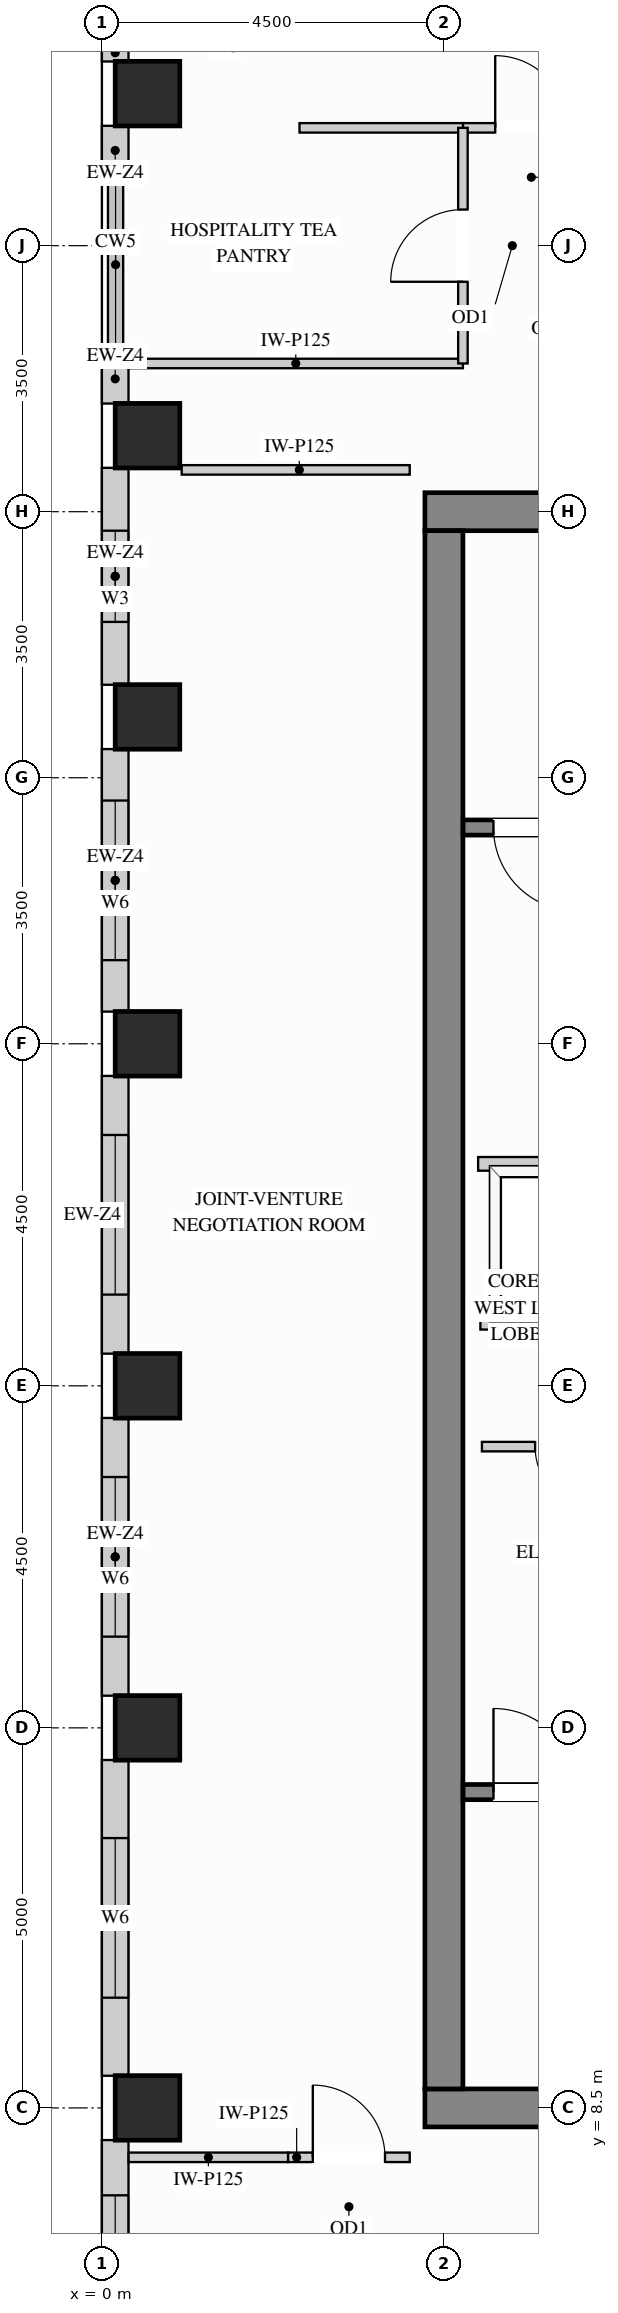
"""IFC4 building model, lengths in metres.
Left out: names, types, materials, properties, quantities, classifications, styles, units other than length and angle.
Written with IfcOpenShell. Run it as: python <this file> out.ifc"""

import sys

from ifc_helpers import new_model, si_unit, direction, frame, frame_2d, origin, origin_2d, place, context, subcontext, project, spatial, rectangle, extrude, source, transform, mapped, element, fill, save


model = new_model("IFC4")
c1 = context("Model", 3, precision=1e-05, world=origin(), true_north=direction((0.0, 1.0)))
c2 = subcontext(c1, "Body", "Model", "MODEL_VIEW")
j1 = project(units=[si_unit("LENGTHUNIT", "METRE"), si_unit("PLANEANGLEUNIT", "RADIAN")], contexts=[c1])
p1 = place(None, origin())
s1 = spatial("IfcSite", under=j1, at=p1, CompositionType="ELEMENT")
p2 = place(p1, origin())
s2 = spatial("IfcBuilding", under=s1, at=p2, CompositionType="ELEMENT")
p3 = place(p2, frame((0.0, 0.0, 262.8)))
s3 = spatial("IfcBuildingStorey", under=s2, at=p3, CompositionType="ELEMENT", Elevation=262.8)
m1 = source(origin(), c2, "Body", "SweptSolid", [
    extrude(rectangle(XDim=0.85, YDim=0.85, at=origin_2d()), origin(), (0.0, 0.0, 1.0), 3.4),
])
for number, where, z_axis, x_axis in (
    (1, (0.6, 13.5, 0.0), (0.0, 0.0, 1.0), (1.0, 0.0, 0.0)),
    (2, (0.6, 18.0, 0.0), (0.0, 0.0, 1.0), (1.0, 0.0, 0.0)),
    (3, (0.6, 22.5, 0.0), (0.0, 0.0, 1.0), (1.0, 0.0, 0.0)),
    (4, (0.6, 26.8, 0.0), (0.0, 0.0, 1.0), (1.0, 0.0, 0.0)),
    (5, (0.6, 30.5, 0.0), (0.0, 0.0, 1.0), (1.0, 0.0, 0.0)),
    (6, (0.6, 35.0, 0.0), (0.0, 0.0, 1.0), (1.0, 0.0, 0.0)),
    (7, (0.6, 8.5, 0.0), (0.0, 0.0, 1.0), (1.0, 0.0, 0.0)),
):
    element("IfcColumn", number, at=place(p3, frame(where, z_axis=z_axis, x_axis=x_axis)), inside=s3, PredefinedType="COLUMN", context=c2, shape_type="MappedRepresentation", body=[
        mapped(m1, transform((0.0, 0.0, 0.0), x_axis=(1.0, 0.0, 0.0), y_axis=(0.0, 1.0, 0.0), z_axis=(0.0, 0.0, 1.0))),
    ])
m2 = source(origin(), c2, "Body", "SweptSolid", [
    extrude(rectangle(XDim=10.5, YDim=0.5, at=frame_2d((5.25, 0.0))), origin(), (0.0, 0.0, 1.0), 3.4),
])
for number, where, z_axis, x_axis in (
    (8, (4.25, 29.5, 0.0), (0.0, 0.0, 1.0), (1.0, 0.0, 0.0)),
    (9, (4.25, 8.5, 0.0), (0.0, 0.0, 1.0), (1.0, 0.0, 0.0)),
):
    element("IfcWall", number, at=place(p3, frame(where, z_axis=z_axis, x_axis=x_axis)), inside=s3, PredefinedType="SHEAR", context=c2, shape_type="MappedRepresentation", body=[
        mapped(m2, transform((0.0, 0.0, 0.0), x_axis=(1.0, 0.0, 0.0), y_axis=(0.0, 1.0, 0.0), z_axis=(0.0, 0.0, 1.0))),
    ])
m3 = source(origin(), c2, "Body", "SweptSolid", [
    extrude(rectangle(XDim=20.5, YDim=0.5, at=frame_2d((10.25, 0.0))), origin(), (0.0, 0.0, 1.0), 3.4),
])
p4 = place(p3, frame((4.5, 8.75, 0.0), z_axis=(0.0, 0.0, 1.0), x_axis=(0.0, 1.0, 0.0)))
e10 = element("IfcWall", 10, at=p4, inside=s3, PredefinedType="SHEAR", context=c2, shape_type="MappedRepresentation", body=[
    mapped(m3, transform((0.0, 0.0, 0.0), x_axis=(1.0, 0.0, 0.0), y_axis=(0.0, 1.0, 0.0), z_axis=(0.0, 0.0, 1.0))),
])
m4 = source(origin(), c2, "Body", "SweptSolid", [
    extrude(rectangle(XDim=0.229, YDim=0.35, at=frame_2d((0.115, 0.0))), origin(), (0.0, 0.0, 1.0), 3.385),
])
p5 = place(p3, frame((0.175, 35.652, 0.0), z_axis=(0.0, 0.0, 1.0), x_axis=(0.0, -1.0, 0.0)))
e11 = element("IfcWall", 11, at=p5, inside=s3, PredefinedType="SOLIDWALL", context=c2, shape_type="MappedRepresentation", body=[
    mapped(m4, transform((0.0, 0.0, 0.0), x_axis=(1.0, 0.0, 0.0), y_axis=(0.0, 1.0, 0.0), z_axis=(0.0, 0.0, 1.0))),
])
m5 = source(origin(), c2, "Body", "SweptSolid", [
    extrude(rectangle(XDim=0.527, YDim=0.35, at=frame_2d((0.263, 0.0))), origin(), (0.0, 0.0, 1.0), 3.385),
])
for number, where, z_axis, x_axis in (
    (12, (0.175, 34.577, 0.0), (0.0, 0.0, 1.0), (0.0, -1.0, 0.0)),
    (13, (0.175, 31.45, 0.0), (0.0, 0.0, 1.0), (0.0, -1.0, 0.0)),
):
    element("IfcWall", number, at=place(p3, frame(where, z_axis=z_axis, x_axis=x_axis)), inside=s3, PredefinedType="SOLIDWALL", context=c2, shape_type="MappedRepresentation", body=[
        mapped(m5, transform((0.0, 0.0, 0.0), x_axis=(1.0, 0.0, 0.0), y_axis=(0.0, 1.0, 0.0), z_axis=(0.0, 0.0, 1.0))),
    ])
p6 = place(p3, frame((0.175, 30.077, 0.0), z_axis=(0.0, 0.0, 1.0), x_axis=(0.0, -1.0, 0.0)))
e14 = element("IfcWall", 14, at=p6, inside=s3, PredefinedType="SOLIDWALL", context=c2, shape_type="SweptSolid", body=[
    extrude(rectangle(XDim=2.854, YDim=0.35, at=frame_2d((1.427, 0.0))), origin(), (0.0, 0.0, 1.0), 3.385),
])
p7 = place(p6, frame((0.827, 0.0, 0.78)))
e15 = element("IfcOpeningElement", 15, at=p7, cuts=e14, PredefinedType="OPENING", context=c2, shape_type="SweptSolid", body=[
    extrude(rectangle(XDim=1.2, YDim=2.25, at=frame_2d((0.6, 1.125))), frame((0.0, 0.185, 0.0), z_axis=(0.0, -1.0, 0.0), x_axis=(1.0, 0.0, 0.0)), (0.0, 0.0, 1.0), 0.37),
])
p8 = place(p3, frame((0.175, 26.377, 0.0), z_axis=(0.0, 0.0, 1.0), x_axis=(0.0, -1.0, 0.0)))
e16 = element("IfcWall", 16, at=p8, inside=s3, PredefinedType="SOLIDWALL", context=c2, shape_type="SweptSolid", body=[
    extrude(rectangle(XDim=3.454, YDim=0.35, at=frame_2d((1.727, 0.0))), origin(), (0.0, 0.0, 1.0), 3.385),
])
p9 = place(p8, frame((0.677, 0.0, 0.78)))
e17 = element("IfcOpeningElement", 17, at=p9, cuts=e16, PredefinedType="OPENING", context=c2, shape_type="SweptSolid", body=[
    extrude(rectangle(XDim=2.1, YDim=2.25, at=frame_2d((1.05, 1.125))), frame((0.0, 0.185, 0.0), z_axis=(0.0, -1.0, 0.0), x_axis=(1.0, 0.0, 0.0)), (0.0, 0.0, 1.0), 0.37),
])
p10 = place(p3, frame((0.175, 22.077, 0.0), z_axis=(0.0, 0.0, 1.0), x_axis=(0.0, -1.0, 0.0)))
e18 = element("IfcWall", 18, at=p10, inside=s3, PredefinedType="SOLIDWALL", context=c2, shape_type="SweptSolid", body=[
    extrude(rectangle(XDim=3.654, YDim=0.35, at=frame_2d((1.827, 0.0))), origin(), (0.0, 0.0, 1.0), 3.385),
])
p11 = place(p10, frame((0.777, 0.0, 0.78)))
e19 = element("IfcOpeningElement", 19, at=p11, cuts=e18, PredefinedType="OPENING", context=c2, shape_type="SweptSolid", body=[
    extrude(rectangle(XDim=2.1, YDim=2.25, at=frame_2d((1.05, 1.125))), frame((0.0, 0.185, 0.0), z_axis=(0.0, -1.0, 0.0), x_axis=(1.0, 0.0, 0.0)), (0.0, 0.0, 1.0), 0.37),
])
p12 = place(p3, frame((0.175, 17.577, 0.0), z_axis=(0.0, 0.0, 1.0), x_axis=(0.0, -1.0, 0.0)))
e20 = element("IfcWall", 20, at=p12, inside=s3, PredefinedType="SOLIDWALL", context=c2, shape_type="SweptSolid", body=[
    extrude(rectangle(XDim=3.654, YDim=0.35, at=frame_2d((1.827, 0.0))), origin(), (0.0, 0.0, 1.0), 3.385),
])
p13 = place(p12, frame((0.777, 0.0, 0.78)))
e21 = element("IfcOpeningElement", 21, at=p13, cuts=e20, PredefinedType="OPENING", context=c2, shape_type="SweptSolid", body=[
    extrude(rectangle(XDim=2.1, YDim=2.25, at=frame_2d((1.05, 1.125))), frame((0.0, 0.185, 0.0), z_axis=(0.0, -1.0, 0.0), x_axis=(1.0, 0.0, 0.0)), (0.0, 0.0, 1.0), 0.37),
])
p14 = place(p3, frame((0.175, 13.077, 0.0), z_axis=(0.0, 0.0, 1.0), x_axis=(0.0, -1.0, 0.0)))
e22 = element("IfcWall", 22, at=p14, inside=s3, PredefinedType="SOLIDWALL", context=c2, shape_type="SweptSolid", body=[
    extrude(rectangle(XDim=4.154, YDim=0.35, at=frame_2d((2.077, 0.0))), origin(), (0.0, 0.0, 1.0), 3.385),
])
p15 = place(p14, frame((1.027, 0.0, 0.78)))
e23 = element("IfcOpeningElement", 23, at=p15, cuts=e22, PredefinedType="OPENING", context=c2, shape_type="SweptSolid", body=[
    extrude(rectangle(XDim=2.1, YDim=2.25, at=frame_2d((1.05, 1.125))), frame((0.0, 0.185, 0.0), z_axis=(0.0, -1.0, 0.0), x_axis=(1.0, 0.0, 0.0)), (0.0, 0.0, 1.0), 0.37),
])
p16 = place(p3, frame((0.175, 8.077, 0.0), z_axis=(0.0, 0.0, 1.0), x_axis=(0.0, -1.0, 0.0)))
e24 = element("IfcWall", 24, at=p16, inside=s3, PredefinedType="SOLIDWALL", context=c2, shape_type="SweptSolid", body=[
    extrude(rectangle(XDim=4.154, YDim=0.35, at=frame_2d((2.077, 0.0))), origin(), (0.0, 0.0, 1.0), 3.385),
])
p17 = place(p16, frame((0.727, 0.0, 0.78)))
e25 = element("IfcOpeningElement", 25, at=p17, cuts=e24, PredefinedType="OPENING", context=c2, shape_type="SweptSolid", body=[
    extrude(rectangle(XDim=2.1, YDim=2.25, at=frame_2d((1.05, 1.125))), frame((0.0, 0.185, 0.0), z_axis=(0.0, -1.0, 0.0), x_axis=(1.0, 0.0, 0.0)), (0.0, 0.0, 1.0), 0.37),
])
m6 = source(origin(), c2, "Body", "SweptSolid", [
    extrude(rectangle(XDim=2.2, YDim=0.18, at=frame_2d((1.1, 0.0))), origin(), (0.0, 0.0, 1.0), 3.385),
])
p18 = place(p3, frame((4.95, 20.92, 0.0), z_axis=(0.0, 0.0, 1.0), x_axis=(1.0, 0.0, 0.0)))
e26 = element("IfcWall", 26, at=p18, inside=s3, PredefinedType="PARTITIONING", context=c2, shape_type="MappedRepresentation", body=[
    mapped(m6, transform((0.0, 0.0, 0.0), x_axis=(1.0, 0.0, 0.0), y_axis=(0.0, 1.0, 0.0), z_axis=(0.0, 0.0, 1.0))),
])
p19 = place(p3, frame((5.0, 17.2, 0.0), z_axis=(0.0, 0.0, 1.0), x_axis=(1.0, 0.0, 0.0)))
e27 = element("IfcWall", 27, at=p19, inside=s3, PredefinedType="PARTITIONING", context=c2, shape_type="SweptSolid", body=[
    extrude(rectangle(XDim=2.4, YDim=0.125, at=frame_2d((1.2, 0.0))), origin(), (0.0, 0.0, 1.0), 3.385),
])
p20 = place(p19, frame((0.7, 0.0, 0.0)))
e28 = element("IfcOpeningElement", 28, at=p20, cuts=e27, PredefinedType="OPENING", context=c2, shape_type="SweptSolid", body=[
    extrude(rectangle(XDim=0.85, YDim=2.1, at=frame_2d((0.425, 1.05))), frame((0.0, 0.073, 0.0), z_axis=(0.0, -1.0, 0.0), x_axis=(1.0, 0.0, 0.0)), (0.0, 0.0, 1.0), 0.145),
])
m7 = source(origin(), c2, "Body", "SweptSolid", [
    extrude(rectangle(XDim=4.398, YDim=0.125, at=frame_2d((2.199, 0.0))), origin(), (0.0, 0.0, 1.0), 3.385),
])
p21 = place(p3, frame((0.352, 31.45, 0.0), z_axis=(0.0, 0.0, 1.0), x_axis=(1.0, 0.0, 0.0)))
e29 = element("IfcWall", 29, at=p21, inside=s3, PredefinedType="PARTITIONING", context=c2, shape_type="MappedRepresentation", body=[
    mapped(m7, transform((0.0, 0.0, 0.0), x_axis=(1.0, 0.0, 0.0), y_axis=(0.0, 1.0, 0.0), z_axis=(0.0, 0.0, 1.0))),
])
m8 = source(origin(), c2, "Body", "SweptSolid", [
    extrude(rectangle(XDim=3.0, YDim=0.125, at=frame_2d((1.5, 0.0))), origin(), (0.0, 0.0, 1.0), 3.385),
])
p22 = place(p3, frame((1.05, 30.05, 0.0), z_axis=(0.0, 0.0, 1.0), x_axis=(1.0, 0.0, 0.0)))
e30 = element("IfcWall", 30, at=p22, inside=s3, PredefinedType="PARTITIONING", context=c2, shape_type="MappedRepresentation", body=[
    mapped(m8, transform((0.0, 0.0, 0.0), x_axis=(1.0, 0.0, 0.0), y_axis=(0.0, 1.0, 0.0), z_axis=(0.0, 0.0, 1.0))),
])
m9 = source(origin(), c2, "Body", "SweptSolid", [
    extrude(rectangle(XDim=2.098, YDim=0.125, at=frame_2d((1.049, 0.0))), origin(), (0.0, 0.0, 1.0), 3.385),
])
p23 = place(p3, frame((0.352, 7.85, 0.0), z_axis=(0.0, 0.0, 1.0), x_axis=(1.0, 0.0, 0.0)))
e31 = element("IfcWall", 31, at=p23, inside=s3, PredefinedType="PARTITIONING", context=c2, shape_type="MappedRepresentation", body=[
    mapped(m9, transform((0.0, 0.0, 0.0), x_axis=(1.0, 0.0, 0.0), y_axis=(0.0, 1.0, 0.0), z_axis=(0.0, 0.0, 1.0))),
])
p24 = place(p3, frame((2.45, 7.85, 0.0), z_axis=(0.0, 0.0, 1.0), x_axis=(1.0, 0.0, 0.0)))
e32 = element("IfcWall", 32, at=p24, inside=s3, PredefinedType="PARTITIONING", context=c2, shape_type="SweptSolid", body=[
    extrude(rectangle(XDim=1.6, YDim=0.125, at=frame_2d((0.8, 0.0))), origin(), (0.0, 0.0, 1.0), 3.385),
])
p25 = place(p24, frame((0.325, 0.0, 0.0)))
e33 = element("IfcOpeningElement", 33, at=p25, cuts=e32, PredefinedType="OPENING", context=c2, shape_type="SweptSolid", body=[
    extrude(rectangle(XDim=0.95, YDim=2.15, at=frame_2d((0.475, 1.075))), frame((0.0, 0.073, 0.0), z_axis=(0.0, -1.0, 0.0), x_axis=(1.0, 0.0, 0.0)), (0.0, 0.0, 1.0), 0.145),
])
p26 = place(p3, frame((4.75, 34.55, 0.0), z_axis=(0.0, 0.0, 1.0), x_axis=(1.0, 0.0, 0.0)))
e34 = element("IfcWall", 34, at=p26, inside=s3, PredefinedType="PARTITIONING", context=c2, shape_type="SweptSolid", body=[
    extrude(rectangle(XDim=1.8, YDim=0.125, at=frame_2d((0.9, 0.0))), origin(), (0.0, 0.0, 1.0), 3.385),
])
p27 = place(p26, frame((0.425, 0.0, 0.0)))
e35 = element("IfcOpeningElement", 35, at=p27, cuts=e34, PredefinedType="OPENING", context=c2, shape_type="SweptSolid", body=[
    extrude(rectangle(XDim=0.95, YDim=2.15, at=frame_2d((0.475, 1.075))), frame((0.0, 0.073, 0.0), z_axis=(0.0, -1.0, 0.0), x_axis=(1.0, 0.0, 0.0)), (0.0, 0.0, 1.0), 0.145),
])
m10 = source(origin(), c2, "Body", "SweptSolid", [
    extrude(rectangle(XDim=2.15, YDim=0.125, at=frame_2d((1.075, 0.0))), origin(), (0.0, 0.0, 1.0), 3.385),
])
p28 = place(p3, frame((2.6, 34.55, 0.0), z_axis=(0.0, 0.0, 1.0), x_axis=(1.0, 0.0, 0.0)))
e36 = element("IfcWall", 36, at=p28, inside=s3, PredefinedType="PARTITIONING", context=c2, shape_type="MappedRepresentation", body=[
    mapped(m10, transform((0.0, 0.0, 0.0), x_axis=(1.0, 0.0, 0.0), y_axis=(0.0, 1.0, 0.0), z_axis=(0.0, 0.0, 1.0))),
])
p29 = place(p3, frame((4.75, 31.45, 0.0), z_axis=(0.0, 0.0, 1.0), x_axis=(0.0, 1.0, 0.0)))
e37 = element("IfcWall", 37, at=p29, inside=s3, PredefinedType="PARTITIONING", context=c2, shape_type="SweptSolid", body=[
    extrude(rectangle(XDim=3.1, YDim=0.125, at=frame_2d((1.55, 0.0))), origin(), (0.0, 0.0, 1.0), 3.385),
])
p30 = place(p29, frame((1.075, 0.0, 0.0)))
e38 = element("IfcOpeningElement", 38, at=p30, cuts=e37, PredefinedType="OPENING", context=c2, shape_type="SweptSolid", body=[
    extrude(rectangle(XDim=0.95, YDim=2.15, at=frame_2d((0.475, 1.075))), frame((0.0, 0.073, 0.0), z_axis=(0.0, -1.0, 0.0), x_axis=(1.0, 0.0, 0.0)), (0.0, 0.0, 1.0), 0.145),
])
m11 = source(origin(), c2, "Body", "SweptSolid", [
    extrude(rectangle(XDim=2.09, YDim=0.2, at=frame_2d((1.045, 0.0))), origin(), (0.0, 0.0, 1.0), 3.385),
])
p31 = place(p3, frame((4.98, 18.84, 0.0), z_axis=(0.0, 0.0, 1.0), x_axis=(1.0, 0.0, 0.0)))
e39 = element("IfcWall", 39, at=p31, inside=s3, PredefinedType="PARTITIONING", context=c2, shape_type="MappedRepresentation", body=[
    mapped(m11, transform((0.0, 0.0, 0.0), x_axis=(1.0, 0.0, 0.0), y_axis=(0.0, 1.0, 0.0), z_axis=(0.0, 0.0, 1.0))),
])
p32 = place(p3, frame((4.752, 12.655, 0.0), z_axis=(0.0, 0.0, 1.0), x_axis=(1.0, 0.0, 0.0)))
e40 = element("IfcWall", 40, at=p32, inside=s3, PredefinedType="SHEAR", context=c2, shape_type="SweptSolid", body=[
    extrude(rectangle(XDim=7.653, YDim=0.2, at=frame_2d((3.827, 0.0))), origin(), (0.0, 0.0, 1.0), 3.4),
])
p33 = place(p32, frame((0.4, 0.0, 0.0)))
e41 = element("IfcOpeningElement", 41, at=p33, cuts=e40, PredefinedType="OPENING", context=c2, shape_type="SweptSolid", body=[
    extrude(rectangle(XDim=1.1, YDim=2.15, at=frame_2d((0.55, 1.075))), frame((0.0, 0.11, 0.0), z_axis=(0.0, -1.0, 0.0), x_axis=(1.0, 0.0, 0.0)), (0.0, 0.0, 1.0), 0.22),
])
p34 = place(p3, frame((4.752, 25.345, 0.0), z_axis=(0.0, 0.0, 1.0), x_axis=(1.0, 0.0, 0.0)))
e42 = element("IfcWall", 42, at=p34, inside=s3, PredefinedType="SHEAR", context=c2, shape_type="SweptSolid", body=[
    extrude(rectangle(XDim=7.653, YDim=0.2, at=frame_2d((3.827, 0.0))), origin(), (0.0, 0.0, 1.0), 3.4),
])
p35 = place(p34, frame((0.4, 0.0, 0.0)))
e43 = element("IfcOpeningElement", 43, at=p35, cuts=e42, PredefinedType="OPENING", context=c2, shape_type="SweptSolid", body=[
    extrude(rectangle(XDim=1.1, YDim=2.15, at=frame_2d((0.55, 1.075))), frame((0.0, 0.11, 0.0), z_axis=(0.0, -1.0, 0.0), x_axis=(1.0, 0.0, 0.0)), (0.0, 0.0, 1.0), 0.22),
])
m12 = source(origin(), c2, "Body", "SweptSolid", [
    extrude(rectangle(XDim=0.95, YDim=2.15, at=frame_2d((0.475, 1.075))), frame((0.0, 0.025, 0.0), z_axis=(0.0, -1.0, 0.0), x_axis=(1.0, 0.0, 0.0)), (0.0, 0.0, 1.0), 0.05),
])
p36 = place(p27, origin())
e44 = element("IfcDoor", 44, at=p36, inside=s3, OperationType="SINGLE_SWING_LEFT", PredefinedType="DOOR", context=c2, shape_type="MappedRepresentation", body=[
    mapped(m12, transform((0.0, 0.0, 0.0), x_axis=(1.0, 0.0, 0.0), y_axis=(0.0, 1.0, 0.0), z_axis=(0.0, 0.0, 1.0))),
])
fill(e35, e44)
p37 = place(p30, origin())
e45 = element("IfcDoor", 45, at=p37, inside=s3, OperationType="SINGLE_SWING_LEFT", PredefinedType="DOOR", context=c2, shape_type="MappedRepresentation", body=[
    mapped(m12, transform((0.0, 0.0, 0.0), x_axis=(1.0, 0.0, 0.0), y_axis=(0.0, 1.0, 0.0), z_axis=(0.0, 0.0, 1.0))),
])
fill(e38, e45)
p38 = place(p25, origin())
e46 = element("IfcDoor", 46, at=p38, inside=s3, OperationType="SINGLE_SWING_LEFT", PredefinedType="DOOR", context=c2, shape_type="MappedRepresentation", body=[
    mapped(m12, transform((0.0, 0.0, 0.0), x_axis=(1.0, 0.0, 0.0), y_axis=(0.0, 1.0, 0.0), z_axis=(0.0, 0.0, 1.0))),
])
fill(e33, e46)
m13 = source(origin(), c2, "Body", "SweptSolid", [
    extrude(rectangle(XDim=0.85, YDim=2.1, at=frame_2d((0.425, 1.05))), frame((0.0, 0.025, 0.0), z_axis=(0.0, -1.0, 0.0), x_axis=(1.0, 0.0, 0.0)), (0.0, 0.0, 1.0), 0.05),
])
p39 = place(p20, origin())
e47 = element("IfcDoor", 47, at=p39, inside=s3, OperationType="SINGLE_SWING_RIGHT", PredefinedType="DOOR", context=c2, shape_type="MappedRepresentation", body=[
    mapped(m13, transform((0.0, 0.0, 0.0), x_axis=(1.0, 0.0, 0.0), y_axis=(0.0, 1.0, 0.0), z_axis=(0.0, 0.0, 1.0))),
])
fill(e28, e47)
m14 = source(origin(), c2, "Body", "SweptSolid", [
    extrude(rectangle(XDim=1.1, YDim=2.15, at=frame_2d((0.55, 1.075))), frame((0.0, 0.025, 0.0), z_axis=(0.0, -1.0, 0.0), x_axis=(1.0, 0.0, 0.0)), (0.0, 0.0, 1.0), 0.05),
])
p40 = place(p33, origin())
e48 = element("IfcDoor", 48, at=p40, inside=s3, OperationType="SINGLE_SWING_LEFT", PredefinedType="DOOR", context=c2, shape_type="MappedRepresentation", body=[
    mapped(m14, transform((0.0, 0.0, 0.0), x_axis=(1.0, 0.0, 0.0), y_axis=(0.0, 1.0, 0.0), z_axis=(0.0, 0.0, 1.0))),
])
fill(e41, e48)
p41 = place(p35, origin())
e49 = element("IfcDoor", 49, at=p41, inside=s3, OperationType="SINGLE_SWING_RIGHT", PredefinedType="DOOR", context=c2, shape_type="MappedRepresentation", body=[
    mapped(m14, transform((0.0, 0.0, 0.0), x_axis=(1.0, 0.0, 0.0), y_axis=(0.0, 1.0, 0.0), z_axis=(0.0, 0.0, 1.0))),
])
fill(e43, e49)
m15 = source(origin(), c2, "Body", "SweptSolid", [
    extrude(rectangle(XDim=1.2, YDim=2.25, at=frame_2d((0.6, 1.125))), frame((0.0, 0.03, 0.0), z_axis=(0.0, -1.0, 0.0), x_axis=(1.0, 0.0, 0.0)), (0.0, 0.0, 1.0), 0.06),
])
p42 = place(p7, origin())
e50 = element("IfcWindow", 50, at=p42, inside=s3, PartitioningType="SINGLE_PANEL", PredefinedType="WINDOW", context=c2, shape_type="MappedRepresentation", body=[
    mapped(m15, transform((0.0, 0.0, 0.0), x_axis=(1.0, 0.0, 0.0), y_axis=(0.0, 1.0, 0.0), z_axis=(0.0, 0.0, 1.0))),
])
fill(e15, e50)
m16 = source(origin(), c2, "Body", "SweptSolid", [
    extrude(rectangle(XDim=2.1, YDim=2.25, at=frame_2d((1.05, 1.125))), frame((0.0, 0.03, 0.0), z_axis=(0.0, -1.0, 0.0), x_axis=(1.0, 0.0, 0.0)), (0.0, 0.0, 1.0), 0.06),
])
p43 = place(p9, origin())
e51 = element("IfcWindow", 51, at=p43, inside=s3, PartitioningType="SINGLE_PANEL", PredefinedType="WINDOW", context=c2, shape_type="MappedRepresentation", body=[
    mapped(m16, transform((0.0, 0.0, 0.0), x_axis=(1.0, 0.0, 0.0), y_axis=(0.0, 1.0, 0.0), z_axis=(0.0, 0.0, 1.0))),
])
fill(e17, e51)
p44 = place(p11, origin())
e52 = element("IfcWindow", 52, at=p44, inside=s3, PartitioningType="SINGLE_PANEL", PredefinedType="WINDOW", context=c2, shape_type="MappedRepresentation", body=[
    mapped(m16, transform((0.0, 0.0, 0.0), x_axis=(1.0, 0.0, 0.0), y_axis=(0.0, 1.0, 0.0), z_axis=(0.0, 0.0, 1.0))),
])
fill(e19, e52)
p45 = place(p13, origin())
e53 = element("IfcWindow", 53, at=p45, inside=s3, PartitioningType="SINGLE_PANEL", PredefinedType="WINDOW", context=c2, shape_type="MappedRepresentation", body=[
    mapped(m16, transform((0.0, 0.0, 0.0), x_axis=(1.0, 0.0, 0.0), y_axis=(0.0, 1.0, 0.0), z_axis=(0.0, 0.0, 1.0))),
])
fill(e21, e53)
p46 = place(p15, origin())
e54 = element("IfcWindow", 54, at=p46, inside=s3, PartitioningType="SINGLE_PANEL", PredefinedType="WINDOW", context=c2, shape_type="MappedRepresentation", body=[
    mapped(m16, transform((0.0, 0.0, 0.0), x_axis=(1.0, 0.0, 0.0), y_axis=(0.0, 1.0, 0.0), z_axis=(0.0, 0.0, 1.0))),
])
fill(e23, e54)
p47 = place(p17, origin())
e55 = element("IfcWindow", 55, at=p47, inside=s3, PartitioningType="SINGLE_PANEL", PredefinedType="WINDOW", context=c2, shape_type="MappedRepresentation", body=[
    mapped(m16, transform((0.0, 0.0, 0.0), x_axis=(1.0, 0.0, 0.0), y_axis=(0.0, 1.0, 0.0), z_axis=(0.0, 0.0, 1.0))),
])
fill(e25, e55)
save(model, sys.argv[1])
